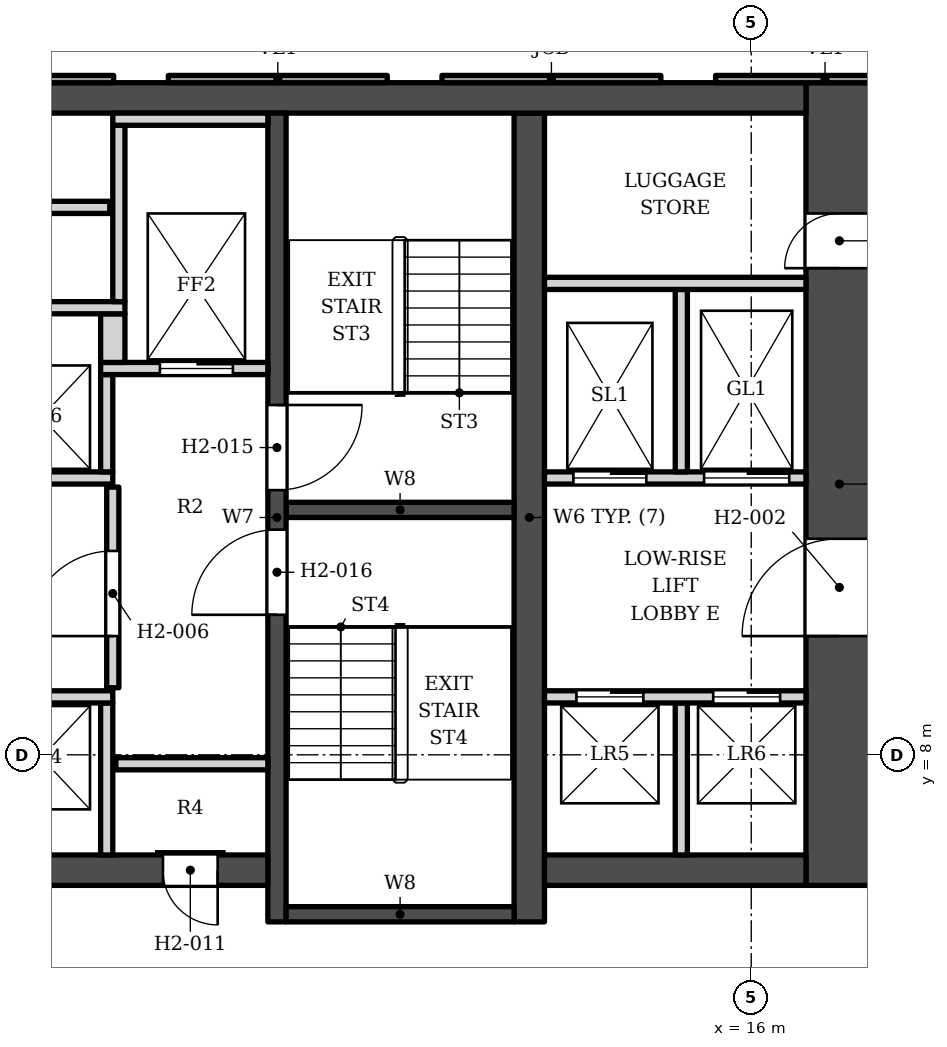
"""IFC4 building model, lengths in metres.
Left out: names, types, materials, properties, quantities, classifications, styles, units other than length and angle.
Written with IfcOpenShell. Run it as: python <this file> out.ifc"""

import sys

from ifc_helpers import new_model, si_unit, direction, frame, frame_2d, origin, place, context, subcontext, project, spatial, polyline, rectangle, outline, extrude, element, fill, save


model = new_model("IFC4")
c1 = context("Model", 3, precision=1e-05, world=origin(), true_north=direction((0.0, 1.0)))
c2 = subcontext(c1, "Body", "Model", "MODEL_VIEW")
j1 = project(units=[si_unit("LENGTHUNIT", "METRE"), si_unit("PLANEANGLEUNIT", "RADIAN")], contexts=[c1])
p1 = place(None, origin())
s1 = spatial("IfcSite", under=j1, at=p1, CompositionType="ELEMENT")
p2 = place(p1, origin())
s2 = spatial("IfcBuilding", under=s1, at=p2, CompositionType="ELEMENT")
p3 = place(p2, frame((0.0, 0.0, 56.2)))
s3 = spatial("IfcBuildingStorey", under=s2, at=p3, CompositionType="ELEMENT", Elevation=56.2)
p4 = place(p3, frame((-16.9, 18.802, 0.0), z_axis=(0.0, 0.0, 1.0), x_axis=(1.0, 0.0, 0.0)))
e1 = element("IfcWall", 1, at=p4, inside=s3, PredefinedType="SHEAR", context=c2, shape_type="SweptSolid", body=[
    extrude(rectangle(XDim=33.8, YDim=0.5, at=frame_2d((16.9, 0.0))), origin(), (0.0, 0.0, 1.0), 3.4),
])
p5 = place(p3, frame((12.35, 5.253, 0.0), z_axis=(0.0, 0.0, 1.0), x_axis=(0.0, 1.0, 0.0)))
e2 = element("IfcWall", 2, at=p5, inside=s3, PredefinedType="SHEAR", context=c2, shape_type="SweptSolid", body=[
    extrude(rectangle(XDim=13.3, YDim=0.5, at=frame_2d((6.65, 0.0))), origin(), (0.0, 0.0, 1.0), 3.4),
])
p6 = place(p3, frame((8.2, 5.253, 0.0), z_axis=(0.0, 0.0, 1.0), x_axis=(0.0, 1.0, 0.0)))
e3 = element("IfcWall", 3, at=p6, inside=s3, PredefinedType="SHEAR", context=c2, shape_type="SweptSolid", body=[
    extrude(rectangle(XDim=13.3, YDim=0.3, at=frame_2d((6.65, 0.0))), origin(), (0.0, 0.0, 1.0), 3.4),
])
p7 = place(p6, frame((7.1, 0.0, 0.0)))
e4 = element("IfcOpeningElement", 4, at=p7, cuts=e3, PredefinedType="OPENING", context=c2, shape_type="SweptSolid", body=[
    extrude(rectangle(XDim=1.4, YDim=2.1, at=frame_2d((0.7, 1.05))), frame((0.0, 0.16, 0.0), z_axis=(0.0, -1.0, 0.0), x_axis=(1.0, 0.0, 0.0)), (0.0, 0.0, 1.0), 0.32),
])
p8 = place(p6, frame((5.05, 0.0, 0.0)))
e5 = element("IfcOpeningElement", 5, at=p8, cuts=e3, PredefinedType="OPENING", context=c2, shape_type="SweptSolid", body=[
    extrude(rectangle(XDim=1.4, YDim=2.1, at=frame_2d((0.7, 1.05))), frame((0.0, 0.16, 0.0), z_axis=(0.0, -1.0, 0.0), x_axis=(1.0, 0.0, 0.0)), (0.0, 0.0, 1.0), 0.32),
])
for number, where, z_axis, x_axis in (
    (6, (8.35, 12.028, 0.0), (0.0, 0.0, 1.0), (1.0, 0.0, 0.0)),
    (7, (8.35, 5.378, 0.0), (0.0, 0.0, 1.0), (1.0, 0.0, 0.0)),
):
    element("IfcWall", number, at=place(p3, frame(where, z_axis=z_axis, x_axis=x_axis)), inside=s3, PredefinedType="SHEAR", context=c2, shape_type="SweptSolid", body=[
        extrude(rectangle(XDim=3.75, YDim=0.25, at=frame_2d((1.875, 0.0))), origin(), (0.0, 0.0, 1.0), 3.4),
    ])
p9 = place(p3, frame((1.0, 6.103, 0.0), z_axis=(0.0, 0.0, 1.0), x_axis=(1.0, 0.0, 0.0)))
e8 = element("IfcWall", 8, at=p9, inside=s3, PredefinedType="SHEAR", context=c2, shape_type="SweptSolid", body=[
    extrude(rectangle(XDim=7.05, YDim=0.5, at=frame_2d((3.525, 0.0))), origin(), (0.0, 0.0, 1.0), 3.4),
])
p10 = place(p9, frame((5.325, 0.0, 0.0)))
e9 = element("IfcOpeningElement", 9, at=p10, cuts=e8, PredefinedType="OPENING", context=c2, shape_type="SweptSolid", body=[
    extrude(rectangle(XDim=0.9, YDim=2.1, at=frame_2d((0.45, 1.05))), frame((0.0, 0.26, 0.0), z_axis=(0.0, -1.0, 0.0), x_axis=(1.0, 0.0, 0.0)), (0.0, 0.0, 1.0), 0.52),
])
p11 = place(p3, frame((12.6, 6.103, 0.0), z_axis=(0.0, 0.0, 1.0), x_axis=(1.0, 0.0, 0.0)))
e10 = element("IfcWall", 10, at=p11, inside=s3, PredefinedType="SHEAR", context=c2, shape_type="SweptSolid", body=[
    extrude(rectangle(XDim=4.3, YDim=0.5, at=frame_2d((2.15, 0.0))), origin(), (0.0, 0.0, 1.0), 3.4),
])
p12 = place(p3, frame((17.45, 5.853, 0.0), z_axis=(0.0, 0.0, 1.0), x_axis=(0.0, 1.0, 0.0)))
e11 = element("IfcWall", 11, at=p12, inside=s3, PredefinedType="SHEAR", context=c2, shape_type="SweptSolid", body=[
    extrude(rectangle(XDim=13.2, YDim=1.1, at=frame_2d((6.6, 0.0))), origin(), (0.0, 0.0, 1.0), 3.4),
])
p13 = place(p12, frame((4.1, 0.0, 0.0)))
e12 = element("IfcOpeningElement", 12, at=p13, cuts=e11, PredefinedType="OPENING", context=c2, shape_type="SweptSolid", body=[
    extrude(rectangle(XDim=1.6, YDim=2.1, at=frame_2d((0.8, 1.05))), frame((0.0, 0.56, 0.0), z_axis=(0.0, -1.0, 0.0), x_axis=(1.0, 0.0, 0.0)), (0.0, 0.0, 1.0), 1.12),
])
p14 = place(p12, frame((10.15, 0.0, 0.0)))
e13 = element("IfcOpeningElement", 13, at=p14, cuts=e11, PredefinedType="OPENING", context=c2, shape_type="SweptSolid", body=[
    extrude(rectangle(XDim=0.9, YDim=2.1, at=frame_2d((0.45, 1.05))), frame((0.0, 0.56, 0.0), z_axis=(0.0, -1.0, 0.0), x_axis=(1.0, 0.0, 0.0)), (0.0, 0.0, 1.0), 1.12),
])
p15 = place(p3, origin())
e14 = element("IfcWall", 14, at=p15, inside=s3, PredefinedType="ELEMENTEDWALL", context=c2, shape_type="SweptSolid", body=[
    extrude(outline(polyline([(15.414, 19.173), (15.414, 19.052), (19.013, 19.052), (19.013, 19.173), (15.414, 19.173)])), origin(), (0.0, 0.0, 1.0), 2.65),
])
p16 = place(p3, origin())
e15 = element("IfcWall", 15, at=p16, inside=s3, PredefinedType="SOLIDWALL", context=c2, shape_type="SweptSolid", body=[
    extrude(outline(polyline([(10.914, 19.173), (10.914, 19.052), (14.514, 19.052), (14.514, 19.173), (10.914, 19.173)])), origin(), (0.0, 0.0, 1.0), 2.65),
])
p17 = place(p3, origin())
e16 = element("IfcWall", 16, at=p17, inside=s3, PredefinedType="ELEMENTEDWALL", context=c2, shape_type="SweptSolid", body=[
    extrude(outline(polyline([(6.414, 19.173), (6.414, 19.052), (10.014, 19.052), (10.014, 19.173), (6.414, 19.173)])), origin(), (0.0, 0.0, 1.0), 2.65),
])
p18 = place(p3, origin())
e17 = element("IfcWall", 17, at=p18, inside=s3, PredefinedType="SOLIDWALL", context=c2, shape_type="SweptSolid", body=[
    extrude(outline(polyline([(1.914, 19.173), (1.914, 19.052), (5.514, 19.052), (5.514, 19.173), (1.914, 19.173)])), origin(), (0.0, 0.0, 1.0), 2.65),
])
for number, where, z_axis, x_axis in (
    (18, (5.4, 6.353, 0.0), (0.0, 0.0, 1.0), (0.0, 1.0, 0.0)),
    (19, (14.85, 6.353, 0.0), (0.0, 0.0, 1.0), (0.0, 1.0, 0.0)),
    (20, (5.55, 7.853, 0.0), (0.0, 0.0, 1.0), (1.0, 0.0, 0.0)),
):
    element("IfcWall", number, at=place(p3, frame(where, z_axis=z_axis, x_axis=x_axis)), inside=s3, PredefinedType="SOLIDWALL", context=c2, shape_type="SweptSolid", body=[
        extrude(rectangle(XDim=2.5, YDim=0.2, at=frame_2d((1.25, 0.0))), origin(), (0.0, 0.0, 1.0), 3.23),
    ])
p19 = place(p3, frame((1.0, 8.953, 0.0), z_axis=(0.0, 0.0, 1.0), x_axis=(1.0, 0.0, 0.0)))
e21 = element("IfcWall", 21, at=p19, inside=s3, PredefinedType="SOLIDWALL", context=c2, shape_type="SweptSolid", body=[
    extrude(rectangle(XDim=4.5, YDim=0.2, at=frame_2d((2.25, 0.0))), origin(), (0.0, 0.0, 1.0), 3.23),
])
p20 = place(p3, frame((12.6, 8.953, 0.0), z_axis=(0.0, 0.0, 1.0), x_axis=(1.0, 0.0, 0.0)))
e22 = element("IfcWall", 22, at=p20, inside=s3, PredefinedType="SOLIDWALL", context=c2, shape_type="SweptSolid", body=[
    extrude(rectangle(XDim=4.3, YDim=0.2, at=frame_2d((2.15, 0.0))), origin(), (0.0, 0.0, 1.0), 3.23),
])
p21 = place(p20, frame((0.525, 0.0, 0.0)))
e23 = element("IfcOpeningElement", 23, at=p21, cuts=e22, PredefinedType="OPENING", context=c2, shape_type="SweptSolid", body=[
    extrude(rectangle(XDim=1.1, YDim=2.1, at=frame_2d((0.55, 1.05))), frame((0.0, 0.11, 0.0), z_axis=(0.0, -1.0, 0.0), x_axis=(1.0, 0.0, 0.0)), (0.0, 0.0, 1.0), 0.22),
])
p22 = place(p20, frame((2.775, 0.0, 0.0)))
e24 = element("IfcOpeningElement", 24, at=p22, cuts=e22, PredefinedType="OPENING", context=c2, shape_type="SweptSolid", body=[
    extrude(rectangle(XDim=1.1, YDim=2.1, at=frame_2d((0.55, 1.05))), frame((0.0, 0.11, 0.0), z_axis=(0.0, -1.0, 0.0), x_axis=(1.0, 0.0, 0.0)), (0.0, 0.0, 1.0), 0.22),
])
p23 = place(p3, frame((5.5, 9.103, 0.0), z_axis=(0.0, 0.0, 1.0), x_axis=(0.0, 1.0, 0.0)))
e25 = element("IfcWall", 25, at=p23, inside=s3, PredefinedType="SOLIDWALL", context=c2, shape_type="SweptSolid", body=[
    extrude(rectangle(XDim=3.3, YDim=0.2, at=frame_2d((1.65, 0.0))), origin(), (0.0, 0.0, 1.0), 3.23),
])
p24 = place(p23, frame((0.85, 0.0, 0.0)))
e26 = element("IfcOpeningElement", 26, at=p24, cuts=e25, PredefinedType="OPENING", context=c2, shape_type="SweptSolid", body=[
    extrude(rectangle(XDim=1.4, YDim=2.1, at=frame_2d((0.7, 1.05))), frame((0.0, 0.11, 0.0), z_axis=(0.0, -1.0, 0.0), x_axis=(1.0, 0.0, 0.0)), (0.0, 0.0, 1.0), 0.22),
])
p25 = place(p3, frame((-1.5, 12.552, 0.0), z_axis=(0.0, 0.0, 1.0), x_axis=(1.0, 0.0, 0.0)))
e27 = element("IfcWall", 27, at=p25, inside=s3, PredefinedType="SOLIDWALL", context=c2, shape_type="SweptSolid", body=[
    extrude(rectangle(XDim=7.0, YDim=0.2, at=frame_2d((3.5, 0.0))), origin(), (0.0, 0.0, 1.0), 3.23),
])
p26 = place(p3, frame((12.6, 12.552, 0.0), z_axis=(0.0, 0.0, 1.0), x_axis=(1.0, 0.0, 0.0)))
e28 = element("IfcWall", 28, at=p26, inside=s3, PredefinedType="SOLIDWALL", context=c2, shape_type="SweptSolid", body=[
    extrude(rectangle(XDim=4.3, YDim=0.2, at=frame_2d((2.15, 0.0))), origin(), (0.0, 0.0, 1.0), 3.23),
])
p27 = place(p26, frame((0.475, 0.0, 0.0)))
e29 = element("IfcOpeningElement", 29, at=p27, cuts=e28, PredefinedType="OPENING", context=c2, shape_type="SweptSolid", body=[
    extrude(rectangle(XDim=1.2, YDim=2.1, at=frame_2d((0.6, 1.05))), frame((0.0, 0.11, 0.0), z_axis=(0.0, -1.0, 0.0), x_axis=(1.0, 0.0, 0.0)), (0.0, 0.0, 1.0), 0.22),
])
p28 = place(p26, frame((2.625, 0.0, 0.0)))
e30 = element("IfcOpeningElement", 30, at=p28, cuts=e28, PredefinedType="OPENING", context=c2, shape_type="SweptSolid", body=[
    extrude(rectangle(XDim=1.4, YDim=2.1, at=frame_2d((0.7, 1.05))), frame((0.0, 0.11, 0.0), z_axis=(0.0, -1.0, 0.0), x_axis=(1.0, 0.0, 0.0)), (0.0, 0.0, 1.0), 0.22),
])
p29 = place(p3, frame((5.4, 12.653, 0.0), z_axis=(0.0, 0.0, 1.0), x_axis=(0.0, 1.0, 0.0)))
e31 = element("IfcWall", 31, at=p29, inside=s3, PredefinedType="SOLIDWALL", context=c2, shape_type="SweptSolid", body=[
    extrude(rectangle(XDim=1.6, YDim=0.2, at=frame_2d((0.8, 0.0))), origin(), (0.0, 0.0, 1.0), 3.23),
])
p30 = place(p3, frame((14.85, 12.653, 0.0), z_axis=(0.0, 0.0, 1.0), x_axis=(0.0, 1.0, 0.0)))
e32 = element("IfcWall", 32, at=p30, inside=s3, PredefinedType="SOLIDWALL", context=c2, shape_type="SweptSolid", body=[
    extrude(rectangle(XDim=3.0, YDim=0.2, at=frame_2d((1.5, 0.0))), origin(), (0.0, 0.0, 1.0), 3.23),
])
p31 = place(p3, frame((5.3, 14.353, 0.0), z_axis=(0.0, 0.0, 1.0), x_axis=(1.0, 0.0, 0.0)))
e33 = element("IfcWall", 33, at=p31, inside=s3, PredefinedType="SOLIDWALL", context=c2, shape_type="SweptSolid", body=[
    extrude(rectangle(XDim=2.75, YDim=0.2, at=frame_2d((1.375, 0.0))), origin(), (0.0, 0.0, 1.0), 3.23),
])
p32 = place(p31, frame((0.975, 0.0, 0.0)))
e34 = element("IfcOpeningElement", 34, at=p32, cuts=e33, PredefinedType="OPENING", context=c2, shape_type="SweptSolid", body=[
    extrude(rectangle(XDim=1.2, YDim=2.1, at=frame_2d((0.6, 1.05))), frame((0.0, 0.11, 0.0), z_axis=(0.0, -1.0, 0.0), x_axis=(1.0, 0.0, 0.0)), (0.0, 0.0, 1.0), 0.22),
])
p33 = place(p3, frame((5.5, 14.453, 0.0), z_axis=(0.0, 0.0, 1.0), x_axis=(0.0, 1.0, 0.0)))
e35 = element("IfcWall", 35, at=p33, inside=s3, PredefinedType="SOLIDWALL", context=c2, shape_type="SweptSolid", body=[
    extrude(rectangle(XDim=0.8, YDim=0.4, at=frame_2d((0.4, 0.0))), origin(), (0.0, 0.0, 1.0), 3.23),
])
p34 = place(p3, frame((-1.5, 15.353, 0.0), z_axis=(0.0, 0.0, 1.0), x_axis=(1.0, 0.0, 0.0)))
e36 = element("IfcWall", 36, at=p34, inside=s3, PredefinedType="SOLIDWALL", context=c2, shape_type="SweptSolid", body=[
    extrude(rectangle(XDim=7.2, YDim=0.2, at=frame_2d((3.6, 0.0))), origin(), (0.0, 0.0, 1.0), 3.23),
])
p35 = place(p3, frame((5.6, 15.453, 0.0), z_axis=(0.0, 0.0, 1.0), x_axis=(0.0, 1.0, 0.0)))
e37 = element("IfcWall", 37, at=p35, inside=s3, PredefinedType="SOLIDWALL", context=c2, shape_type="SweptSolid", body=[
    extrude(rectangle(XDim=2.9, YDim=0.2, at=frame_2d((1.45, 0.0))), origin(), (0.0, 0.0, 1.0), 3.23),
])
p36 = place(p3, frame((12.6, 15.753, 0.0), z_axis=(0.0, 0.0, 1.0), x_axis=(1.0, 0.0, 0.0)))
e38 = element("IfcWall", 38, at=p36, inside=s3, PredefinedType="SOLIDWALL", context=c2, shape_type="SweptSolid", body=[
    extrude(rectangle(XDim=4.3, YDim=0.2, at=frame_2d((2.15, 0.0))), origin(), (0.0, 0.0, 1.0), 3.23),
])
p37 = place(p3, frame((-1.4, 17.003, 0.0), z_axis=(0.0, 0.0, 1.0), x_axis=(1.0, 0.0, 0.0)))
e39 = element("IfcWall", 39, at=p37, inside=s3, PredefinedType="SOLIDWALL", context=c2, shape_type="SweptSolid", body=[
    extrude(rectangle(XDim=6.85, YDim=0.2, at=frame_2d((3.425, 0.0))), origin(), (0.0, 0.0, 1.0), 3.23),
])
p38 = place(p3, frame((5.5, 18.453, 0.0), z_axis=(0.0, 0.0, 1.0), x_axis=(1.0, 0.0, 0.0)))
e40 = element("IfcWall", 40, at=p38, inside=s3, PredefinedType="SOLIDWALL", context=c2, shape_type="SweptSolid", body=[
    extrude(rectangle(XDim=2.55, YDim=0.2, at=frame_2d((1.275, 0.0))), origin(), (0.0, 0.0, 1.0), 3.23),
])
p39 = place(p32, origin())
e41 = element("IfcDoor", 41, at=p39, inside=s3, OperationType="DOUBLE_DOOR_SLIDING", PredefinedType="DOOR", context=c2, shape_type="SweptSolid", body=[
    extrude(rectangle(XDim=1.2, YDim=2.1, at=frame_2d((0.6, 1.05))), frame((0.0, 0.025, 0.0), z_axis=(0.0, -1.0, 0.0), x_axis=(1.0, 0.0, 0.0)), (0.0, 0.0, 1.0), 0.05),
])
fill(e34, e41)
p40 = place(p21, origin())
e42 = element("IfcDoor", 42, at=p40, inside=s3, OperationType="DOUBLE_DOOR_SLIDING", PredefinedType="DOOR", context=c2, shape_type="SweptSolid", body=[
    extrude(rectangle(XDim=1.1, YDim=2.1, at=frame_2d((0.55, 1.05))), frame((0.0, 0.025, 0.0), z_axis=(0.0, -1.0, 0.0), x_axis=(1.0, 0.0, 0.0)), (0.0, 0.0, 1.0), 0.05),
])
fill(e23, e42)
p41 = place(p22, origin())
e43 = element("IfcDoor", 43, at=p41, inside=s3, OperationType="DOUBLE_DOOR_SLIDING", PredefinedType="DOOR", context=c2, shape_type="SweptSolid", body=[
    extrude(rectangle(XDim=1.1, YDim=2.1, at=frame_2d((0.55, 1.05))), frame((0.0, 0.025, 0.0), z_axis=(0.0, -1.0, 0.0), x_axis=(1.0, 0.0, 0.0)), (0.0, 0.0, 1.0), 0.05),
])
fill(e24, e43)
p42 = place(p27, origin())
e44 = element("IfcDoor", 44, at=p42, inside=s3, OperationType="DOUBLE_DOOR_SLIDING", PredefinedType="DOOR", context=c2, shape_type="SweptSolid", body=[
    extrude(rectangle(XDim=1.2, YDim=2.1, at=frame_2d((0.6, 1.05))), frame((0.0, 0.025, 0.0), z_axis=(0.0, -1.0, 0.0), x_axis=(1.0, 0.0, 0.0)), (0.0, 0.0, 1.0), 0.05),
])
fill(e29, e44)
p43 = place(p28, origin())
e45 = element("IfcDoor", 45, at=p43, inside=s3, OperationType="DOUBLE_DOOR_SLIDING", PredefinedType="DOOR", context=c2, shape_type="SweptSolid", body=[
    extrude(rectangle(XDim=1.4, YDim=2.1, at=frame_2d((0.7, 1.05))), frame((0.0, 0.025, 0.0), z_axis=(0.0, -1.0, 0.0), x_axis=(1.0, 0.0, 0.0)), (0.0, 0.0, 1.0), 0.05),
])
fill(e30, e45)
p44 = place(p7, origin())
e46 = element("IfcDoor", 46, at=p44, inside=s3, OperationType="SINGLE_SWING_RIGHT", PredefinedType="DOOR", context=c2, shape_type="SweptSolid", body=[
    extrude(rectangle(XDim=1.4, YDim=2.1, at=frame_2d((0.7, 1.05))), frame((0.0, 0.025, 0.0), z_axis=(0.0, -1.0, 0.0), x_axis=(1.0, 0.0, 0.0)), (0.0, 0.0, 1.0), 0.05),
])
fill(e4, e46)
p45 = place(p8, origin())
e47 = element("IfcDoor", 47, at=p45, inside=s3, OperationType="SINGLE_SWING_LEFT", PredefinedType="DOOR", context=c2, shape_type="SweptSolid", body=[
    extrude(rectangle(XDim=1.4, YDim=2.1, at=frame_2d((0.7, 1.05))), frame((0.0, 0.025, 0.0), z_axis=(0.0, -1.0, 0.0), x_axis=(1.0, 0.0, 0.0)), (0.0, 0.0, 1.0), 0.05),
])
fill(e5, e47)
p46 = place(p24, origin())
e48 = element("IfcDoor", 48, at=p46, inside=s3, OperationType="SINGLE_SWING_LEFT", PredefinedType="DOOR", context=c2, shape_type="SweptSolid", body=[
    extrude(rectangle(XDim=1.4, YDim=2.1, at=frame_2d((0.7, 1.05))), frame((0.0, 0.025, 0.0), z_axis=(0.0, -1.0, 0.0), x_axis=(1.0, 0.0, 0.0)), (0.0, 0.0, 1.0), 0.05),
])
fill(e26, e48)
p47 = place(p10, origin())
e49 = element("IfcDoor", 49, at=p47, inside=s3, OperationType="SINGLE_SWING_RIGHT", PredefinedType="DOOR", context=c2, shape_type="SweptSolid", body=[
    extrude(rectangle(XDim=0.9, YDim=2.1, at=frame_2d((0.45, 1.05))), frame((0.0, 0.025, 0.0), z_axis=(0.0, -1.0, 0.0), x_axis=(1.0, 0.0, 0.0)), (0.0, 0.0, 1.0), 0.05),
])
fill(e9, e49)
p48 = place(p13, origin())
e50 = element("IfcDoor", 50, at=p48, inside=s3, OperationType="DOUBLE_DOOR_SINGLE_SWING", PredefinedType="DOOR", context=c2, shape_type="SweptSolid", body=[
    extrude(rectangle(XDim=1.6, YDim=2.1, at=frame_2d((0.8, 1.05))), frame((0.0, 0.275, 0.0), z_axis=(0.0, -1.0, 0.0), x_axis=(1.0, 0.0, 0.0)), (0.0, 0.0, 1.0), 0.05),
])
fill(e12, e50)
p49 = place(p14, origin())
e51 = element("IfcDoor", 51, at=p49, inside=s3, OperationType="SINGLE_SWING_LEFT", PredefinedType="DOOR", context=c2, shape_type="SweptSolid", body=[
    extrude(rectangle(XDim=0.9, YDim=2.1, at=frame_2d((0.45, 1.05))), frame((0.0, 0.275, 0.0), z_axis=(0.0, -1.0, 0.0), x_axis=(1.0, 0.0, 0.0)), (0.0, 0.0, 1.0), 0.05),
])
fill(e13, e51)
save(model, sys.argv[1])
